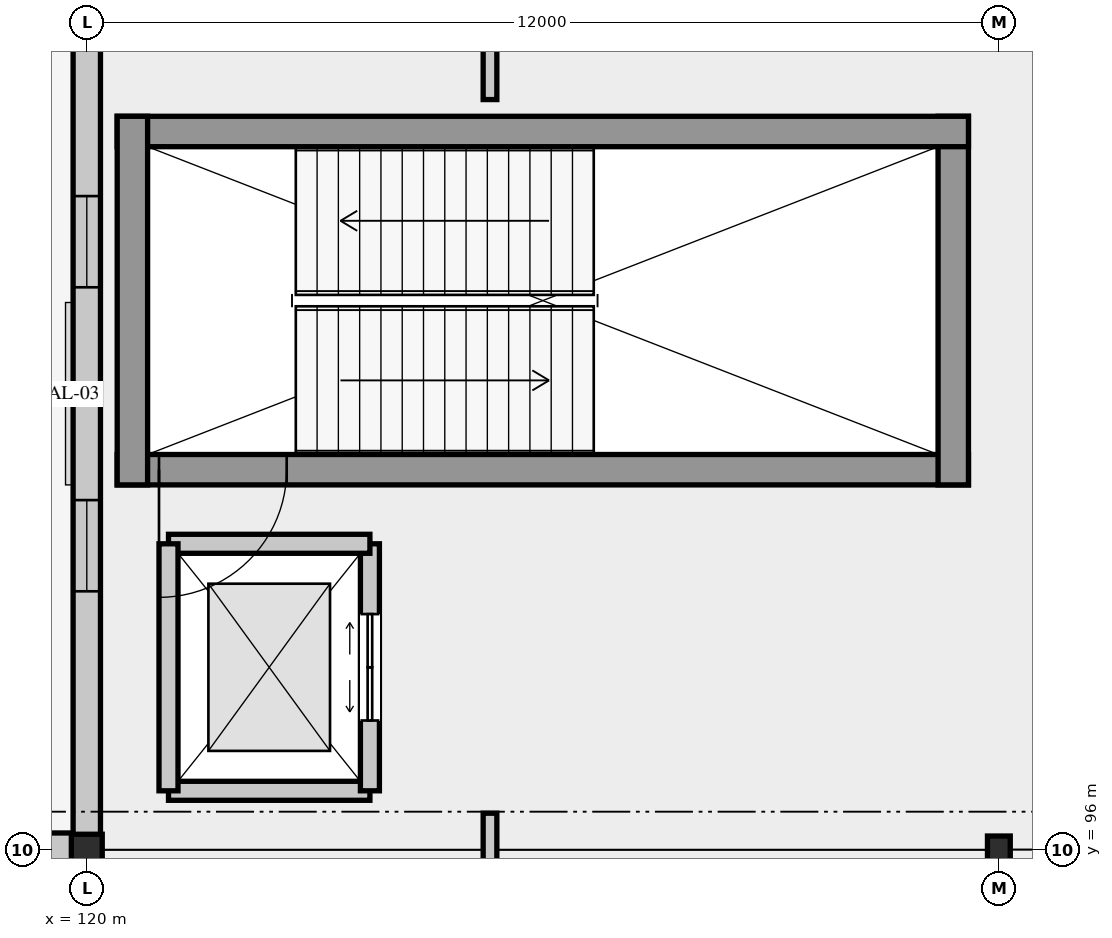
"""IFC4 building model, lengths in metres.
Left out: names, types, materials, properties, quantities, classifications, styles, units other than length and angle.
Written with IfcOpenShell. Run it as: python <this file> out.ifc"""

import sys

from ifc_helpers import new_model, si_unit, direction, frame, frame_2d, origin, origin_2d, place, context, subcontext, project, spatial, rectangle, hollow_circle, i_section, extrude, element, fill, save


model = new_model("IFC4")
c1 = context("Model", 3, precision=1e-05, world=origin(), true_north=direction((0.0, 1.0)))
c2 = subcontext(c1, "Body", "Model", "MODEL_VIEW")
j1 = project(units=[si_unit("LENGTHUNIT", "METRE"), si_unit("PLANEANGLEUNIT", "RADIAN")], contexts=[c1])
p1 = place(None, origin())
s1 = spatial("IfcSite", under=j1, at=p1, CompositionType="ELEMENT")
p2 = place(p1, origin())
s2 = spatial("IfcBuilding", under=s1, at=p2, CompositionType="ELEMENT")
p3 = place(p2, origin())
s3 = spatial("IfcBuildingStorey", under=s2, at=p3, CompositionType="ELEMENT", Elevation=0.0)
p4 = place(p3, frame((120.0, 96.0, 0.0), z_axis=(0.0, 0.0, 1.0), x_axis=(1.0, 0.0, 0.0)))
e1 = element("IfcColumn", 1, at=p4, inside=s3, PredefinedType="COLUMN", context=c2, shape_type="SweptSolid", body=[
    extrude(hollow_circle(Radius=0.203, WallThickness=0.016, at=origin_2d()), origin(), (0.0, 0.0, 1.0), 5.4),
])
p5 = place(p3, frame((132.0, 96.0, 0.0), z_axis=(0.0, 0.0, 1.0), x_axis=(1.0, 0.0, 0.0)))
e2 = element("IfcColumn", 2, at=p5, inside=s3, PredefinedType="COLUMN", context=c2, shape_type="SweptSolid", body=[
    extrude(i_section(OverallWidth=0.3, OverallDepth=0.36, WebThickness=0.012, FlangeThickness=0.022, FilletRadius=0.027, at=origin_2d()), origin(), (0.0, 0.0, 1.0), 5.4),
])
p6 = place(p3, frame((120.0, 96.0, 0.0), z_axis=(0.0, 0.0, 1.0), x_axis=(-1.0, 0.0, 0.0)))
e3 = element("IfcWall", 3, at=p6, inside=s3, PredefinedType="SOLIDWALL", context=c2, shape_type="SweptSolid", body=[
    extrude(rectangle(XDim=12.0, YDim=0.44, at=frame_2d((6.0, 0.0))), origin(), (0.0, 0.0, 1.0), 4.52),
])
p7 = place(p6, frame((1.96, 0.0, 0.0)))
e4 = element("IfcOpeningElement", 4, at=p7, cuts=e3, PredefinedType="OPENING", context=c2, shape_type="SweptSolid", body=[
    extrude(rectangle(XDim=2.8, YDim=2.8, at=frame_2d((1.4, 1.4))), frame((0.0, 0.23, 0.0), z_axis=(0.0, -1.0, 0.0), x_axis=(1.0, 0.0, 0.0)), (0.0, 0.0, 1.0), 0.46),
])
p8 = place(p6, frame((7.44, 0.0, 0.0)))
e5 = element("IfcOpeningElement", 5, at=p8, cuts=e3, PredefinedType="OPENING", context=c2, shape_type="SweptSolid", body=[
    extrude(rectangle(XDim=2.4, YDim=2.6, at=frame_2d((1.2, 1.3))), frame((0.0, 0.23, 0.0), z_axis=(0.0, -1.0, 0.0), x_axis=(1.0, 0.0, 0.0)), (0.0, 0.0, 1.0), 0.46),
])
p9 = place(p3, frame((120.0, 108.0, 0.0), z_axis=(0.0, 0.0, 1.0), x_axis=(0.0, -1.0, 0.0)))
e6 = element("IfcWall", 6, at=p9, inside=s3, PredefinedType="SOLIDWALL", context=c2, shape_type="SweptSolid", body=[
    extrude(rectangle(XDim=12.0, YDim=0.36, at=frame_2d((6.0, 0.0))), origin(), (0.0, 0.0, 1.0), 4.52),
])
p10 = place(p9, frame((3.4, 0.0, 0.95)))
e7 = element("IfcOpeningElement", 7, at=p10, cuts=e6, PredefinedType="OPENING", context=c2, shape_type="SweptSolid", body=[
    extrude(rectangle(XDim=1.2, YDim=1.8, at=frame_2d((0.6, 0.9))), frame((0.0, 0.19, 0.0), z_axis=(0.0, -1.0, 0.0), x_axis=(1.0, 0.0, 0.0)), (0.0, 0.0, 1.0), 0.38),
])
p11 = place(p9, frame((7.4, 0.0, 0.95)))
e8 = element("IfcOpeningElement", 8, at=p11, cuts=e6, PredefinedType="OPENING", context=c2, shape_type="SweptSolid", body=[
    extrude(rectangle(XDim=1.2, YDim=1.8, at=frame_2d((0.6, 0.9))), frame((0.0, 0.19, 0.0), z_axis=(0.0, -1.0, 0.0), x_axis=(1.0, 0.0, 0.0)), (0.0, 0.0, 1.0), 0.38),
])
p12 = place(p3, frame((120.4, 101.0, 0.0), z_axis=(0.0, 0.0, 1.0), x_axis=(1.0, 0.0, 0.0)))
e9 = element("IfcWall", 9, at=p12, inside=s3, PredefinedType="SHEAR", context=c2, shape_type="SweptSolid", body=[
    extrude(rectangle(XDim=11.2, YDim=0.4, at=frame_2d((5.6, 0.0))), origin(), (0.0, 0.0, 1.0), 5.14),
])
p13 = place(p12, frame((0.55, 0.0, 0.0)))
e10 = element("IfcOpeningElement", 10, at=p13, cuts=e9, PredefinedType="OPENING", context=c2, shape_type="SweptSolid", body=[
    extrude(rectangle(XDim=1.68, YDim=2.35, at=frame_2d((0.84, 1.175))), frame((0.0, 0.21, 0.0), z_axis=(0.0, -1.0, 0.0), x_axis=(1.0, 0.0, 0.0)), (0.0, 0.0, 1.0), 0.42),
])
p14 = place(p3, frame((131.4, 100.8, 0.0), z_axis=(0.0, 0.0, 1.0), x_axis=(0.0, 1.0, 0.0)))
e11 = element("IfcWall", 11, at=p14, inside=s3, PredefinedType="SHEAR", context=c2, shape_type="SweptSolid", body=[
    extrude(rectangle(XDim=4.85, YDim=0.4, at=frame_2d((2.425, 0.0))), origin(), (0.0, 0.0, 1.0), 5.14),
])
p15 = place(p3, frame((131.6, 105.45, 0.0), z_axis=(0.0, 0.0, 1.0), x_axis=(-1.0, 0.0, 0.0)))
e12 = element("IfcWall", 12, at=p15, inside=s3, PredefinedType="SHEAR", context=c2, shape_type="SweptSolid", body=[
    extrude(rectangle(XDim=11.2, YDim=0.4, at=frame_2d((5.6, 0.0))), origin(), (0.0, 0.0, 1.0), 5.14),
])
p16 = place(p3, frame((120.6, 105.65, 0.0), z_axis=(0.0, 0.0, 1.0), x_axis=(0.0, -1.0, 0.0)))
e13 = element("IfcWall", 13, at=p16, inside=s3, PredefinedType="SHEAR", context=c2, shape_type="SweptSolid", body=[
    extrude(rectangle(XDim=4.85, YDim=0.4, at=frame_2d((2.425, 0.0))), origin(), (0.0, 0.0, 1.0), 5.14),
])
p17 = place(p3, frame((121.075, 96.775, 0.0), z_axis=(0.0, 0.0, 1.0), x_axis=(1.0, 0.0, 0.0)))
e14 = element("IfcWall", 14, at=p17, inside=s3, PredefinedType="SOLIDWALL", context=c2, shape_type="SweptSolid", body=[
    extrude(rectangle(XDim=2.65, YDim=0.25, at=frame_2d((1.325, 0.0))), origin(), (0.0, 0.0, 1.0), 5.14),
])
p18 = place(p3, frame((123.725, 96.775, 0.0), z_axis=(0.0, 0.0, 1.0), x_axis=(0.0, 1.0, 0.0)))
e15 = element("IfcWall", 15, at=p18, inside=s3, PredefinedType="SOLIDWALL", context=c2, shape_type="SweptSolid", body=[
    extrude(rectangle(XDim=3.25, YDim=0.25, at=frame_2d((1.625, 0.0))), origin(), (0.0, 0.0, 1.0), 5.14),
])
p19 = place(p18, frame((0.925, 0.0, 0.0)))
e16 = element("IfcOpeningElement", 16, at=p19, cuts=e15, PredefinedType="OPENING", context=c2, shape_type="SweptSolid", body=[
    extrude(rectangle(XDim=1.4, YDim=2.3, at=frame_2d((0.7, 1.15))), frame((0.0, 0.135, 0.0), z_axis=(0.0, -1.0, 0.0), x_axis=(1.0, 0.0, 0.0)), (0.0, 0.0, 1.0), 0.27),
])
p20 = place(p3, frame((123.725, 100.025, 0.0), z_axis=(0.0, 0.0, 1.0), x_axis=(-1.0, 0.0, 0.0)))
e17 = element("IfcWall", 17, at=p20, inside=s3, PredefinedType="SOLIDWALL", context=c2, shape_type="SweptSolid", body=[
    extrude(rectangle(XDim=2.65, YDim=0.25, at=frame_2d((1.325, 0.0))), origin(), (0.0, 0.0, 1.0), 5.14),
])
p21 = place(p3, frame((121.075, 100.025, 0.0), z_axis=(0.0, 0.0, 1.0), x_axis=(0.0, -1.0, 0.0)))
e18 = element("IfcWall", 18, at=p21, inside=s3, PredefinedType="SOLIDWALL", context=c2, shape_type="SweptSolid", body=[
    extrude(rectangle(XDim=3.25, YDim=0.25, at=frame_2d((1.625, 0.0))), origin(), (0.0, 0.0, 1.0), 5.14),
])
p22 = place(p3, frame((125.305, 93.87, 0.0), z_axis=(0.0, 0.0, 1.0), x_axis=(0.0, 1.0, 0.0)))
e19 = element("IfcWall", 19, at=p22, inside=s3, PredefinedType="PARTITIONING", context=c2, shape_type="SweptSolid", body=[
    extrude(rectangle(XDim=2.61, YDim=0.18, at=frame_2d((1.305, 0.0))), origin(), (0.0, 0.0, 1.0), 4.53),
])
p23 = place(p22, frame((0.65, 0.0, 0.0)))
e20 = element("IfcOpeningElement", 20, at=p23, cuts=e19, PredefinedType="OPENING", context=c2, shape_type="SweptSolid", body=[
    extrude(rectangle(XDim=1.15, YDim=2.25, at=frame_2d((0.575, 1.125))), frame((0.0, 0.1, 0.0), z_axis=(0.0, -1.0, 0.0), x_axis=(1.0, 0.0, 0.0)), (0.0, 0.0, 1.0), 0.2),
])
p24 = place(p3, frame((125.305, 105.87, 0.0), z_axis=(0.0, 0.0, 1.0), x_axis=(0.0, 1.0, 0.0)))
e21 = element("IfcWall", 21, at=p24, inside=s3, PredefinedType="PARTITIONING", context=c2, shape_type="SweptSolid", body=[
    extrude(rectangle(XDim=1.75, YDim=0.18, at=frame_2d((0.875, 0.0))), origin(), (0.0, 0.0, 1.0), 5.12),
])
p25 = place(p10, origin())
e22 = element("IfcWindow", 22, at=p25, inside=s3, PartitioningType="SINGLE_PANEL", PredefinedType="WINDOW", context=c2, shape_type="SweptSolid", body=[
    extrude(rectangle(XDim=1.2, YDim=1.8, at=frame_2d((0.6, 0.9))), frame((0.0, 0.03, 0.0), z_axis=(0.0, -1.0, 0.0), x_axis=(1.0, 0.0, 0.0)), (0.0, 0.0, 1.0), 0.06),
])
fill(e7, e22)
p26 = place(p11, origin())
e23 = element("IfcWindow", 23, at=p26, inside=s3, PartitioningType="SINGLE_PANEL", PredefinedType="WINDOW", context=c2, shape_type="SweptSolid", body=[
    extrude(rectangle(XDim=1.2, YDim=1.8, at=frame_2d((0.6, 0.9))), frame((0.0, 0.03, 0.0), z_axis=(0.0, -1.0, 0.0), x_axis=(1.0, 0.0, 0.0)), (0.0, 0.0, 1.0), 0.06),
])
fill(e8, e23)
p27 = place(p13, frame((1.68, 0.0, 0.0), z_axis=(0.0, 0.0, 1.0), x_axis=(-1.0, 0.0, 0.0)))
e24 = element("IfcDoor", 24, at=p27, inside=s3, OperationType="DOUBLE_DOOR_SINGLE_SWING", PredefinedType="DOOR", context=c2, shape_type="SweptSolid", body=[
    extrude(rectangle(XDim=1.68, YDim=2.35, at=frame_2d((0.84, 1.175))), frame((0.0, 0.025, 0.0), z_axis=(0.0, -1.0, 0.0), x_axis=(1.0, 0.0, 0.0)), (0.0, 0.0, 1.0), 0.05),
])
fill(e10, e24)
p28 = place(p19, origin())
e25 = element("IfcDoor", 25, at=p28, inside=s3, OperationType="SLIDING_TO_LEFT", PredefinedType="DOOR", context=c2, shape_type="SweptSolid", body=[
    extrude(rectangle(XDim=1.4, YDim=2.3, at=frame_2d((0.7, 1.15))), frame((0.0, 0.025, 0.0), z_axis=(0.0, -1.0, 0.0), x_axis=(1.0, 0.0, 0.0)), (0.0, 0.0, 1.0), 0.05),
])
fill(e16, e25)
save(model, sys.argv[1])
